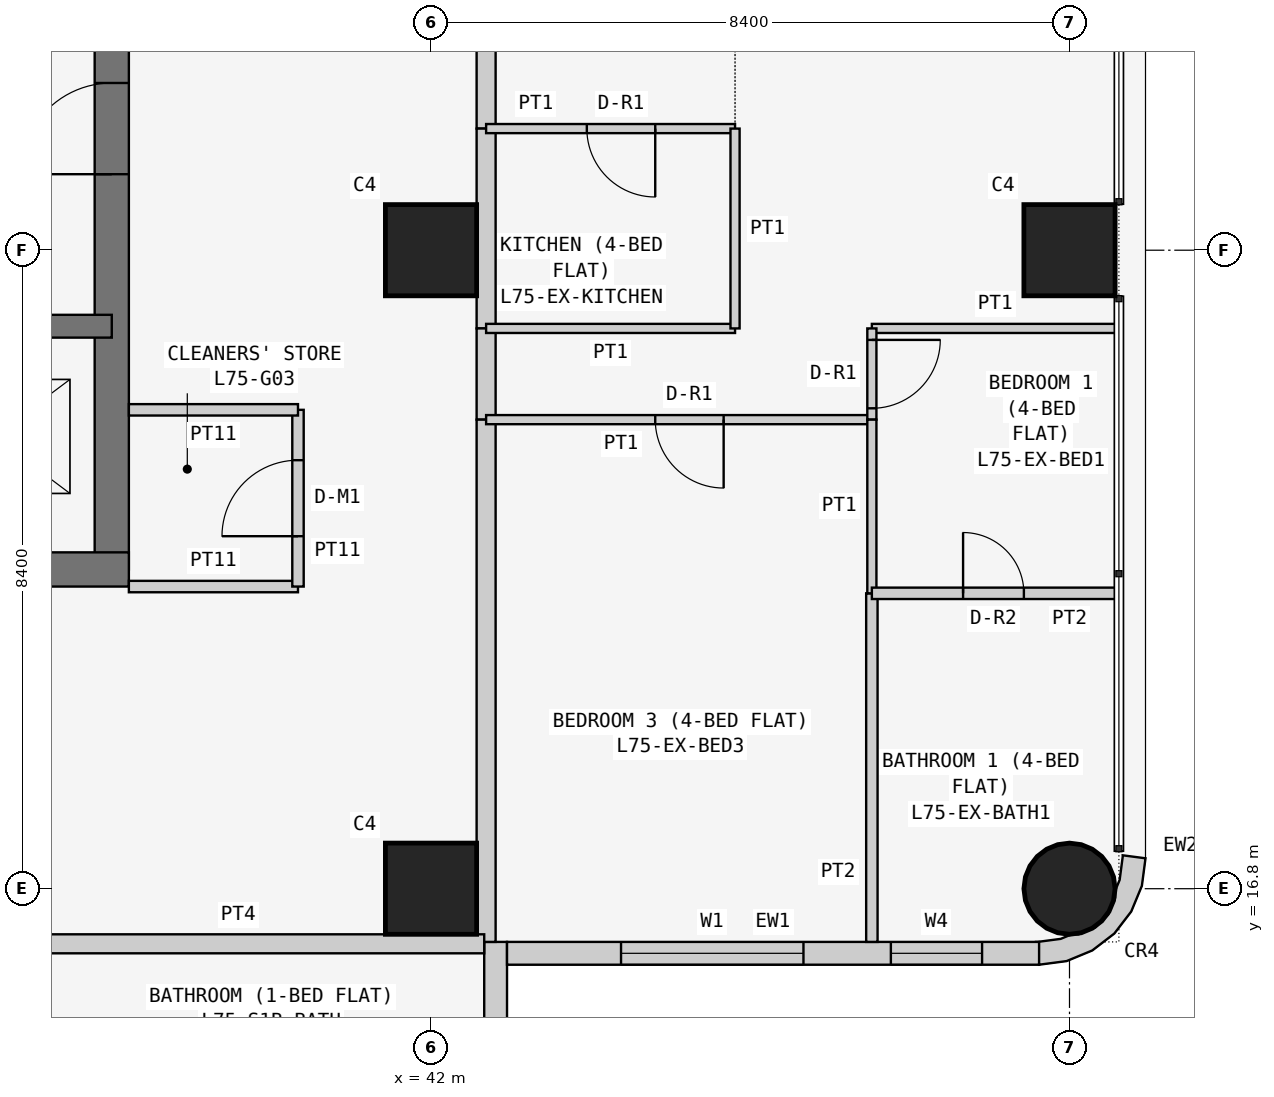
"""IFC4 building model, lengths in metres.
Left out: names, types, materials, properties, quantities, classifications, styles, units other than length and angle.
Written with IfcOpenShell. Run it as: python <this file> out.ifc"""

import sys

from ifc_helpers import new_model, si_unit, direction, frame, frame_2d, origin, origin_2d, place, context, subcontext, project, spatial, polyline, rectangle, circle, outline, extrude, element, fill, save


model = new_model("IFC4")
c1 = context("Model", 3, precision=1e-05, world=origin(), true_north=direction((0.0, 1.0)))
c2 = subcontext(c1, "Body", "Model", "MODEL_VIEW")
j1 = project(units=[si_unit("LENGTHUNIT", "METRE"), si_unit("PLANEANGLEUNIT", "RADIAN")], contexts=[c1])
p1 = place(None, origin())
s1 = spatial("IfcSite", under=j1, at=p1, CompositionType="ELEMENT")
p2 = place(p1, origin())
s2 = spatial("IfcBuilding", under=s1, at=p2, CompositionType="ELEMENT")
p3 = place(p2, frame((0.0, 0.0, 286.5)))
s3 = spatial("IfcBuildingStorey", under=s2, at=p3, CompositionType="ELEMENT", Elevation=286.5)
for number, where, z_axis, x_axis in (
    (1, (42.0, 16.8, 0.0), (0.0, 0.0, 1.0), (1.0, 0.0, 0.0)),
    (2, (42.0, 25.2, 0.0), (0.0, 0.0, 1.0), (1.0, 0.0, 0.0)),
):
    element("IfcColumn", number, at=place(p3, frame(where, z_axis=z_axis, x_axis=x_axis)), inside=s3, PredefinedType="COLUMN", context=c2, shape_type="SweptSolid", body=[
        extrude(rectangle(XDim=1.2, YDim=1.2, at=origin_2d()), origin(), (0.0, 0.0, 1.0), 3.6),
    ])
p4 = place(p3, frame((50.4, 16.8, 0.0), z_axis=(0.0, 0.0, 1.0), x_axis=(1.0, 0.0, 0.0)))
e3 = element("IfcColumn", 3, at=p4, inside=s3, PredefinedType="COLUMN", context=c2, shape_type="SweptSolid", body=[
    extrude(circle(Radius=0.6, at=origin_2d()), origin(), (0.0, 0.0, 1.0), 3.6),
])
p5 = place(p3, frame((50.4, 25.2, 0.0), z_axis=(0.0, 0.0, 1.0), x_axis=(1.0, 0.0, 0.0)))
e4 = element("IfcColumn", 4, at=p5, inside=s3, PredefinedType="COLUMN", context=c2, shape_type="SweptSolid", body=[
    extrude(rectangle(XDim=1.2, YDim=1.2, at=origin_2d()), origin(), (0.0, 0.0, 1.0), 3.6),
])
p6 = place(p3, frame((21.0, 21.0, 0.0), z_axis=(0.0, 0.0, 1.0), x_axis=(1.0, 0.0, 0.0)))
e5 = element("IfcWall", 5, at=p6, inside=s3, PredefinedType="SHEAR", context=c2, shape_type="SweptSolid", body=[
    extrude(rectangle(XDim=17.025, YDim=0.45, at=frame_2d((8.512, 0.0))), origin(), (0.0, 0.0, 1.0), 3.6),
])
p7 = place(p3, frame((37.8, 21.0, 0.0), z_axis=(0.0, 0.0, 1.0), x_axis=(0.0, 1.0, 0.0)))
e6 = element("IfcWall", 6, at=p7, inside=s3, PredefinedType="SHEAR", context=c2, shape_type="SweptSolid", body=[
    extrude(rectangle(XDim=17.025, YDim=0.45, at=frame_2d((8.512, 0.0))), origin(), (0.0, 0.0, 1.0), 3.6),
])
p8 = place(p7, frame((5.2, 0.0, 0.0)))
e7 = element("IfcOpeningElement", 7, at=p8, cuts=e6, PredefinedType="OPENING", context=c2, shape_type="SweptSolid", body=[
    extrude(rectangle(XDim=1.2, YDim=2.1, at=frame_2d((0.6, 1.05))), frame((0.0, 0.235, 0.0), z_axis=(0.0, -1.0, 0.0), x_axis=(1.0, 0.0, 0.0)), (0.0, 0.0, 1.0), 0.47),
])
p9 = place(p3, frame((26.6, 24.2, 0.0), z_axis=(0.0, 0.0, 1.0), x_axis=(1.0, 0.0, 0.0)))
e8 = element("IfcWall", 8, at=p9, inside=s3, PredefinedType="SHEAR", context=c2, shape_type="SweptSolid", body=[
    extrude(rectangle(XDim=11.2, YDim=0.3, at=frame_2d((5.6, 0.0))), origin(), (0.0, 0.0, 1.0), 3.6),
])
p10 = place(p9, frame((0.913, 0.0, 0.0)))
e9 = element("IfcOpeningElement", 9, at=p10, cuts=e8, PredefinedType="OPENING", context=c2, shape_type="SweptSolid", body=[
    extrude(rectangle(XDim=1.0, YDim=2.1, at=frame_2d((0.5, 1.05))), frame((0.0, 0.16, 0.0), z_axis=(0.0, -1.0, 0.0), x_axis=(1.0, 0.0, 0.0)), (0.0, 0.0, 1.0), 0.32),
])
p11 = place(p9, frame((3.7, 0.0, 0.0)))
e10 = element("IfcOpeningElement", 10, at=p11, cuts=e8, PredefinedType="OPENING", context=c2, shape_type="SweptSolid", body=[
    extrude(rectangle(XDim=1.0, YDim=2.1, at=frame_2d((0.5, 1.05))), frame((0.0, 0.16, 0.0), z_axis=(0.0, -1.0, 0.0), x_axis=(1.0, 0.0, 0.0)), (0.0, 0.0, 1.0), 0.32),
])
p12 = place(p9, frame((6.5, 0.0, 0.0)))
e11 = element("IfcOpeningElement", 11, at=p12, cuts=e8, PredefinedType="OPENING", context=c2, shape_type="SweptSolid", body=[
    extrude(rectangle(XDim=1.0, YDim=2.1, at=frame_2d((0.5, 1.05))), frame((0.0, 0.16, 0.0), z_axis=(0.0, -1.0, 0.0), x_axis=(1.0, 0.0, 0.0)), (0.0, 0.0, 1.0), 0.32),
])
p13 = place(p9, frame((9.1, 0.0, 0.0)))
e12 = element("IfcOpeningElement", 12, at=p13, cuts=e8, PredefinedType="OPENING", context=c2, shape_type="SweptSolid", body=[
    extrude(rectangle(XDim=1.1, YDim=2.1, at=frame_2d((0.55, 1.05))), frame((0.0, 0.16, 0.0), z_axis=(0.0, -1.0, 0.0), x_axis=(1.0, 0.0, 0.0)), (0.0, 0.0, 1.0), 0.32),
])
p14 = place(p3, frame((42.85, 8.8, 0.0), z_axis=(0.0, 0.0, 1.0), x_axis=(0.0, 1.0, 0.0)))
e13 = element("IfcWall", 13, at=p14, inside=s3, PredefinedType="SOLIDWALL", context=c2, shape_type="SweptSolid", body=[
    extrude(rectangle(XDim=7.3, YDim=0.3, at=frame_2d((3.65, 0.0))), origin(), (0.0, 0.0, 1.0), 3.45),
])
p15 = place(p14, frame((3.1, 0.0, 0.9)))
e14 = element("IfcOpeningElement", 14, at=p15, cuts=e13, PredefinedType="OPENING", context=c2, shape_type="SweptSolid", body=[
    extrude(rectangle(XDim=2.4, YDim=1.5, at=frame_2d((1.2, 0.75))), frame((0.0, 0.16, 0.0), z_axis=(0.0, -1.0, 0.0), x_axis=(1.0, 0.0, 0.0)), (0.0, 0.0, 1.0), 0.32),
])
p16 = place(p14, frame((0.75, 0.0, 0.9)))
e15 = element("IfcOpeningElement", 15, at=p16, cuts=e13, PredefinedType="OPENING", context=c2, shape_type="SweptSolid", body=[
    extrude(rectangle(XDim=1.2, YDim=1.5, at=frame_2d((0.6, 0.75))), frame((0.0, 0.16, 0.0), z_axis=(0.0, -1.0, 0.0), x_axis=(1.0, 0.0, 0.0)), (0.0, 0.0, 1.0), 0.32),
])
p17 = place(p3, frame((43.0, 15.95, 0.0), z_axis=(0.0, 0.0, 1.0), x_axis=(1.0, 0.0, 0.0)))
e16 = element("IfcWall", 16, at=p17, inside=s3, PredefinedType="SOLIDWALL", context=c2, shape_type="SweptSolid", body=[
    extrude(rectangle(XDim=7.0, YDim=0.3, at=frame_2d((3.5, 0.0))), origin(), (0.0, 0.0, 1.0), 3.45),
])
p18 = place(p17, frame((1.5, 0.0, 0.9)))
e17 = element("IfcOpeningElement", 17, at=p18, cuts=e16, PredefinedType="OPENING", context=c2, shape_type="SweptSolid", body=[
    extrude(rectangle(XDim=2.4, YDim=1.5, at=frame_2d((1.2, 0.75))), frame((0.0, 0.16, 0.0), z_axis=(0.0, -1.0, 0.0), x_axis=(1.0, 0.0, 0.0)), (0.0, 0.0, 1.0), 0.32),
])
p19 = place(p17, frame((5.05, 0.0, 0.9)))
e18 = element("IfcOpeningElement", 18, at=p19, cuts=e16, PredefinedType="OPENING", context=c2, shape_type="SweptSolid", body=[
    extrude(rectangle(XDim=1.2, YDim=1.5, at=frame_2d((0.6, 0.75))), frame((0.0, 0.16, 0.0), z_axis=(0.0, -1.0, 0.0), x_axis=(1.0, 0.0, 0.0)), (0.0, 0.0, 1.0), 0.32),
])
p20 = place(p3, frame((50.038, 16.224, 0.0), z_axis=(0.0, 0.0, 1.0), x_axis=(0.707106781187, -0.707106781187, 0.0)))
e19 = element("IfcWall", 19, at=p20, inside=s3, PredefinedType="SOLIDWALL", context=c2, shape_type="SweptSolid", body=[
    extrude(outline(polyline([(0.047, 1.455), (0.233, 1.212), (0.292, 1.069), (0.358, 1.003), (0.449, 0.782), (0.449, 0.543), (0.358, 0.322), (0.292, 0.257), (0.233, 0.114), (0.047, -0.129), (0.033, -0.143), (0.273, -0.327), (0.495, -0.037), (0.635, 0.301), (0.683, 0.663), (0.635, 1.025), (0.495, 1.363), (0.273, 1.653), (0.033, 1.469), (0.047, 1.455)])), origin(), (0.0, 0.0, 1.0), 3.45),
])
p21 = place(p3, frame((38.025, 20.775, 0.0), z_axis=(0.0, 0.0, 1.0), x_axis=(1.0, 0.0, 0.0)))
e20 = element("IfcWall", 20, at=p21, inside=s3, PredefinedType="PARTITIONING", context=c2, shape_type="SweptSolid", body=[
    extrude(rectangle(XDim=2.225, YDim=0.15, at=frame_2d((1.113, 0.0))), origin(), (0.0, 0.0, 1.0), 3.45),
])
p22 = place(p3, frame((40.25, 20.775, 0.0), z_axis=(0.0, 0.0, 1.0), x_axis=(0.0, 1.0, 0.0)))
e21 = element("IfcWall", 21, at=p22, inside=s3, PredefinedType="PARTITIONING", context=c2, shape_type="SweptSolid", body=[
    extrude(rectangle(XDim=2.325, YDim=0.15, at=frame_2d((1.163, 0.0))), origin(), (0.0, 0.0, 1.0), 3.45),
])
p23 = place(p22, frame((0.663, 0.0, 0.0)))
e22 = element("IfcOpeningElement", 22, at=p23, cuts=e21, PredefinedType="OPENING", context=c2, shape_type="SweptSolid", body=[
    extrude(rectangle(XDim=1.0, YDim=2.1, at=frame_2d((0.5, 1.05))), frame((0.0, 0.085, 0.0), z_axis=(0.0, -1.0, 0.0), x_axis=(1.0, 0.0, 0.0)), (0.0, 0.0, 1.0), 0.17),
])
p24 = place(p3, frame((40.25, 23.1, 0.0), z_axis=(0.0, 0.0, 1.0), x_axis=(-1.0, 0.0, 0.0)))
e23 = element("IfcWall", 23, at=p24, inside=s3, PredefinedType="PARTITIONING", context=c2, shape_type="SweptSolid", body=[
    extrude(rectangle(XDim=2.225, YDim=0.15, at=frame_2d((1.113, 0.0))), origin(), (0.0, 0.0, 1.0), 3.45),
])
p25 = place(p3, frame((42.725, 32.0, 0.0), z_axis=(0.0, 0.0, 1.0), x_axis=(0.0, -1.0, 0.0)))
e24 = element("IfcWall", 24, at=p25, inside=s3, PredefinedType="PARTITIONING", context=c2, shape_type="SweptSolid", body=[
    extrude(rectangle(XDim=5.2, YDim=0.25, at=frame_2d((2.6, 0.0))), origin(), (0.0, 0.0, 1.0), 3.45),
])
p26 = place(p25, frame((2.1, 0.0, 0.0)))
e25 = element("IfcOpeningElement", 25, at=p26, cuts=e24, PredefinedType="OPENING", context=c2, shape_type="SweptSolid", body=[
    extrude(rectangle(XDim=1.0, YDim=2.1, at=frame_2d((0.5, 1.05))), frame((0.0, 0.135, 0.0), z_axis=(0.0, -1.0, 0.0), x_axis=(1.0, 0.0, 0.0)), (0.0, 0.0, 1.0), 0.27),
])
p27 = place(p3, frame((42.725, 26.8, 0.0), z_axis=(0.0, 0.0, 1.0), x_axis=(0.0, -1.0, 0.0)))
e26 = element("IfcWall", 26, at=p27, inside=s3, PredefinedType="PARTITIONING", context=c2, shape_type="SweptSolid", body=[
    extrude(rectangle(XDim=2.629, YDim=0.25, at=frame_2d((1.314, 0.0))), origin(), (0.0, 0.0, 1.0), 3.45),
])
p28 = place(p3, frame((42.725, 24.171, 0.0), z_axis=(0.0, 0.0, 1.0), x_axis=(0.0, -1.0, 0.0)))
e27 = element("IfcWall", 27, at=p28, inside=s3, PredefinedType="PARTITIONING", context=c2, shape_type="SweptSolid", body=[
    extrude(rectangle(XDim=1.2, YDim=0.25, at=frame_2d((0.6, 0.0))), origin(), (0.0, 0.0, 1.0), 3.45),
])
p29 = place(p3, frame((42.725, 22.971, 0.0), z_axis=(0.0, 0.0, 1.0), x_axis=(0.0, -1.0, 0.0)))
e28 = element("IfcWall", 28, at=p29, inside=s3, PredefinedType="PARTITIONING", context=c2, shape_type="SweptSolid", body=[
    extrude(rectangle(XDim=6.871, YDim=0.25, at=frame_2d((3.436, 0.0))), origin(), (0.0, 0.0, 1.0), 3.45),
])
p30 = place(p3, frame((42.7, 16.075, 0.0), z_axis=(0.0, 0.0, 1.0), x_axis=(-1.0, 0.0, 0.0)))
e29 = element("IfcWall", 29, at=p30, inside=s3, PredefinedType="PARTITIONING", context=c2, shape_type="SweptSolid", body=[
    extrude(rectangle(XDim=6.471, YDim=0.25, at=frame_2d((3.235, 0.0))), origin(), (0.0, 0.0, 1.0), 3.45),
])
p31 = place(p3, frame((42.725, 26.8, 0.0), z_axis=(0.0, 0.0, 1.0), x_axis=(1.0, 0.0, 0.0)))
e30 = element("IfcWall", 30, at=p31, inside=s3, PredefinedType="PARTITIONING", context=c2, shape_type="SweptSolid", body=[
    extrude(rectangle(XDim=3.275, YDim=0.12, at=frame_2d((1.637, 0.0))), origin(), (0.0, 0.0, 1.0), 3.45),
])
p32 = place(p31, frame((1.325, 0.0, 0.0)))
e31 = element("IfcOpeningElement", 31, at=p32, cuts=e30, PredefinedType="OPENING", context=c2, shape_type="SweptSolid", body=[
    extrude(rectangle(XDim=0.9, YDim=2.1, at=frame_2d((0.45, 1.05))), frame((0.0, 0.07, 0.0), z_axis=(0.0, -1.0, 0.0), x_axis=(1.0, 0.0, 0.0)), (0.0, 0.0, 1.0), 0.14),
])
p33 = place(p3, frame((42.725, 24.171, 0.0), z_axis=(0.0, 0.0, 1.0), x_axis=(1.0, 0.0, 0.0)))
e32 = element("IfcWall", 32, at=p33, inside=s3, PredefinedType="PARTITIONING", context=c2, shape_type="SweptSolid", body=[
    extrude(rectangle(XDim=3.275, YDim=0.12, at=frame_2d((1.637, 0.0))), origin(), (0.0, 0.0, 1.0), 3.45),
])
p34 = place(p3, frame((46.0, 24.171, 0.0), z_axis=(0.0, 0.0, 1.0), x_axis=(0.0, 1.0, 0.0)))
e33 = element("IfcWall", 33, at=p34, inside=s3, PredefinedType="PARTITIONING", context=c2, shape_type="SweptSolid", body=[
    extrude(rectangle(XDim=2.629, YDim=0.12, at=frame_2d((1.314, 0.0))), origin(), (0.0, 0.0, 1.0), 3.45),
])
p35 = place(p3, frame((47.8, 22.971, 0.0), z_axis=(0.0, 0.0, 1.0), x_axis=(-1.0, 0.0, 0.0)))
e34 = element("IfcWall", 34, at=p35, inside=s3, PredefinedType="PARTITIONING", context=c2, shape_type="SweptSolid", body=[
    extrude(rectangle(XDim=5.075, YDim=0.12, at=frame_2d((2.538, 0.0))), origin(), (0.0, 0.0, 1.0), 3.45),
])
p36 = place(p35, frame((1.95, 0.0, 0.0)))
e35 = element("IfcOpeningElement", 35, at=p36, cuts=e34, PredefinedType="OPENING", context=c2, shape_type="SweptSolid", body=[
    extrude(rectangle(XDim=0.9, YDim=2.1, at=frame_2d((0.45, 1.05))), frame((0.0, 0.07, 0.0), z_axis=(0.0, -1.0, 0.0), x_axis=(1.0, 0.0, 0.0)), (0.0, 0.0, 1.0), 0.14),
])
p37 = place(p3, frame((51.05, 24.171, 0.0), z_axis=(0.0, 0.0, 1.0), x_axis=(-1.0, 0.0, 0.0)))
e36 = element("IfcWall", 36, at=p37, inside=s3, PredefinedType="PARTITIONING", context=c2, shape_type="SweptSolid", body=[
    extrude(rectangle(XDim=3.25, YDim=0.12, at=frame_2d((1.625, 0.0))), origin(), (0.0, 0.0, 1.0), 3.45),
])
p38 = place(p3, frame((47.8, 24.171, 0.0), z_axis=(0.0, 0.0, 1.0), x_axis=(0.0, -1.0, 0.0)))
e37 = element("IfcWall", 37, at=p38, inside=s3, PredefinedType="PARTITIONING", context=c2, shape_type="SweptSolid", body=[
    extrude(rectangle(XDim=1.2, YDim=0.12, at=frame_2d((0.6, 0.0))), origin(), (0.0, 0.0, 1.0), 3.45),
])
p39 = place(p38, frame((0.151, 0.0, 0.0)))
e38 = element("IfcOpeningElement", 38, at=p39, cuts=e37, PredefinedType="OPENING", context=c2, shape_type="SweptSolid", body=[
    extrude(rectangle(XDim=0.9, YDim=2.1, at=frame_2d((0.45, 1.05))), frame((0.0, 0.07, 0.0), z_axis=(0.0, -1.0, 0.0), x_axis=(1.0, 0.0, 0.0)), (0.0, 0.0, 1.0), 0.14),
])
p40 = place(p3, frame((47.8, 16.1, 0.0), z_axis=(0.0, 0.0, 1.0), x_axis=(0.0, 1.0, 0.0)))
e39 = element("IfcWall", 39, at=p40, inside=s3, PredefinedType="PARTITIONING", context=c2, shape_type="SweptSolid", body=[
    extrude(rectangle(XDim=4.586, YDim=0.15, at=frame_2d((2.293, 0.0))), origin(), (0.0, 0.0, 1.0), 3.45),
])
p41 = place(p3, frame((47.8, 20.686, 0.0), z_axis=(0.0, 0.0, 1.0), x_axis=(0.0, 1.0, 0.0)))
e40 = element("IfcWall", 40, at=p41, inside=s3, PredefinedType="PARTITIONING", context=c2, shape_type="SweptSolid", body=[
    extrude(rectangle(XDim=2.285, YDim=0.12, at=frame_2d((1.143, 0.0))), origin(), (0.0, 0.0, 1.0), 3.45),
])
p42 = place(p3, frame((51.05, 20.686, 0.0), z_axis=(0.0, 0.0, 1.0), x_axis=(-1.0, 0.0, 0.0)))
e41 = element("IfcWall", 41, at=p42, inside=s3, PredefinedType="PARTITIONING", context=c2, shape_type="SweptSolid", body=[
    extrude(rectangle(XDim=3.25, YDim=0.15, at=frame_2d((1.625, 0.0))), origin(), (0.0, 0.0, 1.0), 3.45),
])
p43 = place(p42, frame((1.25, 0.0, 0.0)))
e42 = element("IfcOpeningElement", 42, at=p43, cuts=e41, PredefinedType="OPENING", context=c2, shape_type="SweptSolid", body=[
    extrude(rectangle(XDim=0.8, YDim=2.1, at=frame_2d((0.4, 1.05))), frame((0.0, 0.085, 0.0), z_axis=(0.0, -1.0, 0.0), x_axis=(1.0, 0.0, 0.0)), (0.0, 0.0, 1.0), 0.17),
])
p44 = place(p18, origin())
e43 = element("IfcWindow", 43, at=p44, inside=s3, PartitioningType="SINGLE_PANEL", PredefinedType="WINDOW", context=c2, shape_type="SweptSolid", body=[
    extrude(rectangle(XDim=2.4, YDim=1.5, at=frame_2d((1.2, 0.75))), frame((0.0, 0.03, 0.0), z_axis=(0.0, -1.0, 0.0), x_axis=(1.0, 0.0, 0.0)), (0.0, 0.0, 1.0), 0.06),
])
fill(e17, e43)
p45 = place(p19, origin())
e44 = element("IfcWindow", 44, at=p45, inside=s3, PartitioningType="SINGLE_PANEL", PredefinedType="WINDOW", context=c2, shape_type="SweptSolid", body=[
    extrude(rectangle(XDim=1.2, YDim=1.5, at=frame_2d((0.6, 0.75))), frame((0.0, 0.03, 0.0), z_axis=(0.0, -1.0, 0.0), x_axis=(1.0, 0.0, 0.0)), (0.0, 0.0, 1.0), 0.06),
])
fill(e18, e44)
p46 = place(p23, origin())
e45 = element("IfcDoor", 45, at=p46, inside=s3, OperationType="SINGLE_SWING_LEFT", PredefinedType="DOOR", context=c2, shape_type="SweptSolid", body=[
    extrude(rectangle(XDim=1.0, YDim=2.1, at=frame_2d((0.5, 1.05))), frame((0.0, 0.025, 0.0), z_axis=(0.0, -1.0, 0.0), x_axis=(1.0, 0.0, 0.0)), (0.0, 0.0, 1.0), 0.05),
])
fill(e22, e45)
p47 = place(p32, frame((0.9, 0.0, 0.0), z_axis=(0.0, 0.0, 1.0), x_axis=(-1.0, 0.0, 0.0)))
e46 = element("IfcDoor", 46, at=p47, inside=s3, OperationType="SINGLE_SWING_LEFT", PredefinedType="DOOR", context=c2, shape_type="SweptSolid", body=[
    extrude(rectangle(XDim=0.9, YDim=2.1, at=frame_2d((0.45, 1.05))), frame((0.0, 0.025, 0.0), z_axis=(0.0, -1.0, 0.0), x_axis=(1.0, 0.0, 0.0)), (0.0, 0.0, 1.0), 0.05),
])
fill(e31, e46)
p48 = place(p36, origin())
e47 = element("IfcDoor", 47, at=p48, inside=s3, OperationType="SINGLE_SWING_LEFT", PredefinedType="DOOR", context=c2, shape_type="SweptSolid", body=[
    extrude(rectangle(XDim=0.9, YDim=2.1, at=frame_2d((0.45, 1.05))), frame((0.0, 0.025, 0.0), z_axis=(0.0, -1.0, 0.0), x_axis=(1.0, 0.0, 0.0)), (0.0, 0.0, 1.0), 0.05),
])
fill(e35, e47)
p49 = place(p39, origin())
e48 = element("IfcDoor", 48, at=p49, inside=s3, OperationType="SINGLE_SWING_LEFT", PredefinedType="DOOR", context=c2, shape_type="SweptSolid", body=[
    extrude(rectangle(XDim=0.9, YDim=2.1, at=frame_2d((0.45, 1.05))), frame((0.0, 0.025, 0.0), z_axis=(0.0, -1.0, 0.0), x_axis=(1.0, 0.0, 0.0)), (0.0, 0.0, 1.0), 0.05),
])
fill(e38, e48)
p50 = place(p43, frame((0.8, 0.0, 0.0), z_axis=(0.0, 0.0, 1.0), x_axis=(-1.0, 0.0, 0.0)))
e49 = element("IfcDoor", 49, at=p50, inside=s3, OperationType="SINGLE_SWING_LEFT", PredefinedType="DOOR", context=c2, shape_type="SweptSolid", body=[
    extrude(rectangle(XDim=0.8, YDim=2.1, at=frame_2d((0.4, 1.05))), frame((0.0, 0.025, 0.0), z_axis=(0.0, -1.0, 0.0), x_axis=(1.0, 0.0, 0.0)), (0.0, 0.0, 1.0), 0.05),
])
fill(e42, e49)
p51 = place(p8, origin())
e50 = element("IfcDoor", 50, at=p51, inside=s3, OperationType="SINGLE_SWING_LEFT", PredefinedType="DOOR", context=c2, shape_type="SweptSolid", body=[
    extrude(rectangle(XDim=1.2, YDim=2.1, at=frame_2d((0.6, 1.05))), frame((0.0, 0.025, 0.0), z_axis=(0.0, -1.0, 0.0), x_axis=(1.0, 0.0, 0.0)), (0.0, 0.0, 1.0), 0.05),
])
fill(e7, e50)
save(model, sys.argv[1])
